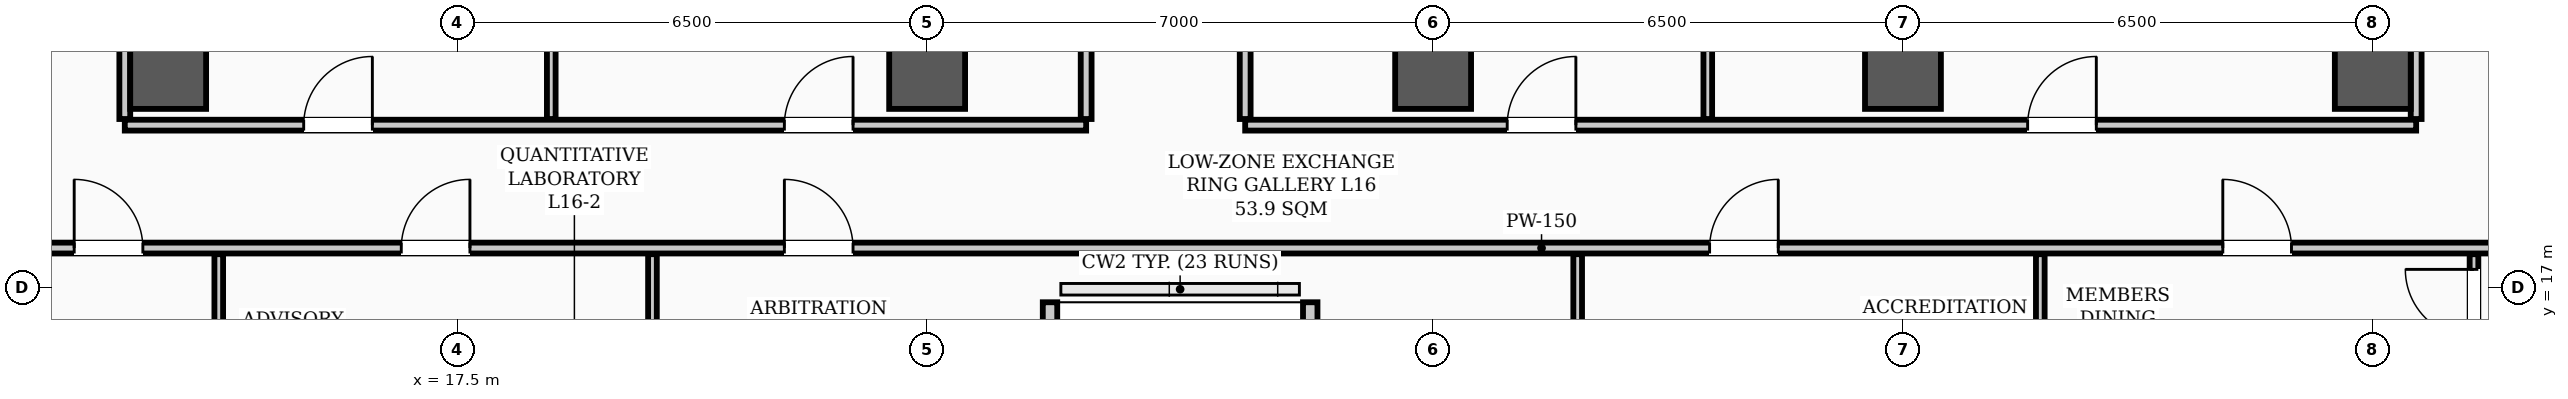
"""IFC4 building model, lengths in metres.
Left out: names, types, materials, properties, quantities, classifications, styles, units other than length and angle.
Written with IfcOpenShell. Run it as: python <this file> out.ifc"""

import sys

from ifc_helpers import new_model, si_unit, direction, frame, frame_2d, origin, origin_2d, place, context, subcontext, project, spatial, rectangle, hollow_rectangle, extrude, element, fill, save


model = new_model("IFC4")
c1 = context("Model", 3, precision=1e-05, world=origin(), true_north=direction((0.0, 1.0)))
c2 = subcontext(c1, "Body", "Model", "MODEL_VIEW")
j1 = project(units=[si_unit("LENGTHUNIT", "METRE"), si_unit("PLANEANGLEUNIT", "RADIAN")], contexts=[c1])
p1 = place(None, origin())
s1 = spatial("IfcSite", under=j1, at=p1, CompositionType="ELEMENT")
p2 = place(p1, origin())
s2 = spatial("IfcBuilding", under=s1, at=p2, CompositionType="ELEMENT")
p3 = place(p2, frame((0.0, 0.0, 65.5)))
s3 = spatial("IfcBuildingStorey", under=s2, at=p3, CompositionType="ELEMENT", Elevation=65.5)
for number, where, z_axis, x_axis in (
    (1, (13.5, 20.0, 0.0), (0.0, 0.0, 1.0), (1.0, 0.0, 0.0)),
    (2, (24.0, 20.0, 0.0), (0.0, 0.0, 1.0), (1.0, 0.0, 0.0)),
    (3, (31.0, 20.0, 0.0), (0.0, 0.0, 1.0), (1.0, 0.0, 0.0)),
    (4, (37.5, 20.0, 0.0), (0.0, 0.0, 1.0), (1.0, 0.0, 0.0)),
    (5, (44.0, 20.0, 0.0), (0.0, 0.0, 1.0), (1.0, 0.0, 0.0)),
):
    element("IfcColumn", number, at=place(p3, frame(where, z_axis=z_axis, x_axis=x_axis)), inside=s3, PredefinedType="COLUMN", context=c2, shape_type="SweptSolid", body=[
        extrude(hollow_rectangle(XDim=1.05, YDim=1.05, WallThickness=0.038, InnerFilletRadius=0.019, OuterFilletRadius=0.057, at=origin_2d()), origin(), (0.0, 0.0, 1.0), 3.9),
    ])
for number, where, z_axis, x_axis in (
    (6, (25.7, 15.1, 0.0), (0.0, 0.0, 1.0), (0.0, 1.0, 0.0)),
    (7, (29.3, 16.8, 0.0), (0.0, 0.0, 1.0), (0.0, -1.0, 0.0)),
):
    element("IfcWall", number, at=place(p3, frame(where, z_axis=z_axis, x_axis=x_axis)), inside=s3, PredefinedType="PARAPET", context=c2, shape_type="SweptSolid", body=[
        extrude(rectangle(XDim=1.7, YDim=0.2, at=frame_2d((0.85, 0.0))), origin(), (0.0, 0.0, 1.0), 1.2),
    ])
p4 = place(p3, frame((10.16, 17.55, 0.0), z_axis=(0.0, 0.0, 1.0), x_axis=(1.0, 0.0, 0.0)))
e8 = element("IfcWall", 8, at=p4, inside=s3, PredefinedType="PARTITIONING", context=c2, shape_type="SweptSolid", body=[
    extrude(rectangle(XDim=44.68, YDim=0.15, at=frame_2d((22.34, 0.0))), origin(), (0.0, 0.0, 1.0), 3.1),
])
p5 = place(p4, frame((2.04, 0.0, 0.0)))
e9 = element("IfcOpeningElement", 9, at=p5, cuts=e8, PredefinedType="OPENING", context=c2, shape_type="SweptSolid", body=[
    extrude(rectangle(XDim=0.95, YDim=2.08, at=frame_2d((0.475, 1.04))), frame((0.0, 0.085, 0.0), z_axis=(0.0, -1.0, 0.0), x_axis=(1.0, 0.0, 0.0)), (0.0, 0.0, 1.0), 0.17),
])
p6 = place(p4, frame((6.565, 0.0, 0.0)))
e10 = element("IfcOpeningElement", 10, at=p6, cuts=e8, PredefinedType="OPENING", context=c2, shape_type="SweptSolid", body=[
    extrude(rectangle(XDim=0.95, YDim=2.08, at=frame_2d((0.475, 1.04))), frame((0.0, 0.085, 0.0), z_axis=(0.0, -1.0, 0.0), x_axis=(1.0, 0.0, 0.0)), (0.0, 0.0, 1.0), 0.17),
])
p7 = place(p4, frame((11.865, 0.0, 0.0)))
e11 = element("IfcOpeningElement", 11, at=p7, cuts=e8, PredefinedType="OPENING", context=c2, shape_type="SweptSolid", body=[
    extrude(rectangle(XDim=0.95, YDim=2.08, at=frame_2d((0.475, 1.04))), frame((0.0, 0.085, 0.0), z_axis=(0.0, -1.0, 0.0), x_axis=(1.0, 0.0, 0.0)), (0.0, 0.0, 1.0), 0.17),
])
p8 = place(p4, frame((24.665, 0.0, 0.0)))
e12 = element("IfcOpeningElement", 12, at=p8, cuts=e8, PredefinedType="OPENING", context=c2, shape_type="SweptSolid", body=[
    extrude(rectangle(XDim=0.95, YDim=2.08, at=frame_2d((0.475, 1.04))), frame((0.0, 0.085, 0.0), z_axis=(0.0, -1.0, 0.0), x_axis=(1.0, 0.0, 0.0)), (0.0, 0.0, 1.0), 0.17),
])
p9 = place(p4, frame((31.765, 0.0, 0.0)))
e13 = element("IfcOpeningElement", 13, at=p9, cuts=e8, PredefinedType="OPENING", context=c2, shape_type="SweptSolid", body=[
    extrude(rectangle(XDim=0.95, YDim=2.08, at=frame_2d((0.475, 1.04))), frame((0.0, 0.085, 0.0), z_axis=(0.0, -1.0, 0.0), x_axis=(1.0, 0.0, 0.0)), (0.0, 0.0, 1.0), 0.17),
])
p10 = place(p3, frame((12.9, 19.25, 0.0), z_axis=(0.0, 0.0, 1.0), x_axis=(1.0, 0.0, 0.0)))
e14 = element("IfcWall", 14, at=p10, inside=s3, PredefinedType="PARTITIONING", context=c2, shape_type="SweptSolid", body=[
    extrude(rectangle(XDim=13.3, YDim=0.15, at=frame_2d((6.65, 0.0))), origin(), (0.0, 0.0, 1.0), 3.1),
])
p11 = place(p10, frame((2.475, 0.0, 0.0)))
e15 = element("IfcOpeningElement", 15, at=p11, cuts=e14, PredefinedType="OPENING", context=c2, shape_type="SweptSolid", body=[
    extrude(rectangle(XDim=0.95, YDim=2.08, at=frame_2d((0.475, 1.04))), frame((0.0, 0.085, 0.0), z_axis=(0.0, -1.0, 0.0), x_axis=(1.0, 0.0, 0.0)), (0.0, 0.0, 1.0), 0.17),
])
p12 = place(p10, frame((9.125, 0.0, 0.0)))
e16 = element("IfcOpeningElement", 16, at=p12, cuts=e14, PredefinedType="OPENING", context=c2, shape_type="SweptSolid", body=[
    extrude(rectangle(XDim=0.95, YDim=2.08, at=frame_2d((0.475, 1.04))), frame((0.0, 0.085, 0.0), z_axis=(0.0, -1.0, 0.0), x_axis=(1.0, 0.0, 0.0)), (0.0, 0.0, 1.0), 0.17),
])
p13 = place(p3, frame((28.4, 19.25, 0.0), z_axis=(0.0, 0.0, 1.0), x_axis=(1.0, 0.0, 0.0)))
e17 = element("IfcWall", 17, at=p13, inside=s3, PredefinedType="PARTITIONING", context=c2, shape_type="SweptSolid", body=[
    extrude(rectangle(XDim=16.2, YDim=0.15, at=frame_2d((8.1, 0.0))), origin(), (0.0, 0.0, 1.0), 3.1),
])
p14 = place(p13, frame((3.625, 0.0, 0.0)))
e18 = element("IfcOpeningElement", 18, at=p14, cuts=e17, PredefinedType="OPENING", context=c2, shape_type="SweptSolid", body=[
    extrude(rectangle(XDim=0.95, YDim=2.08, at=frame_2d((0.475, 1.04))), frame((0.0, 0.085, 0.0), z_axis=(0.0, -1.0, 0.0), x_axis=(1.0, 0.0, 0.0)), (0.0, 0.0, 1.0), 0.17),
])
p15 = place(p13, frame((10.825, 0.0, 0.0)))
e19 = element("IfcOpeningElement", 19, at=p15, cuts=e17, PredefinedType="OPENING", context=c2, shape_type="SweptSolid", body=[
    extrude(rectangle(XDim=0.95, YDim=2.08, at=frame_2d((0.475, 1.04))), frame((0.0, 0.085, 0.0), z_axis=(0.0, -1.0, 0.0), x_axis=(1.0, 0.0, 0.0)), (0.0, 0.0, 1.0), 0.17),
])
for number, where, z_axis, x_axis in (
    (20, (26.2, 19.335, 0.0), (0.0, 0.0, 1.0), (0.0, 1.0, 0.0)),
    (21, (28.4, 19.335, 0.0), (0.0, 0.0, 1.0), (0.0, 1.0, 0.0)),
    (22, (12.9, 19.335, 0.0), (0.0, 0.0, 1.0), (0.0, 1.0, 0.0)),
    (23, (44.6, 19.335, 0.0), (0.0, 0.0, 1.0), (0.0, 1.0, 0.0)),
):
    element("IfcWall", number, at=place(p3, frame(where, z_axis=z_axis, x_axis=x_axis)), inside=s3, PredefinedType="PARTITIONING", context=c2, shape_type="SweptSolid", body=[
        extrude(rectangle(XDim=7.38, YDim=0.15, at=frame_2d((3.69, 0.0))), origin(), (0.0, 0.0, 1.0), 3.0),
    ])
for number, where, z_axis, x_axis in (
    (24, (14.2, 15.31, 0.0), (0.0, 0.0, 1.0), (0.0, 1.0, 0.0)),
    (25, (20.2, 15.31, 0.0), (0.0, 0.0, 1.0), (0.0, 1.0, 0.0)),
    (26, (33.0, 15.31, 0.0), (0.0, 0.0, 1.0), (0.0, 1.0, 0.0)),
    (27, (39.4, 15.31, 0.0), (0.0, 0.0, 1.0), (0.0, 1.0, 0.0)),
):
    element("IfcWall", number, at=place(p3, frame(where, z_axis=z_axis, x_axis=x_axis)), inside=s3, PredefinedType="PARTITIONING", context=c2, shape_type="SweptSolid", body=[
        extrude(rectangle(XDim=2.155, YDim=0.12, at=frame_2d((1.078, 0.0))), origin(), (0.0, 0.0, 1.0), 3.212),
    ])
p16 = place(p3, frame((45.4, 15.31, 0.0), z_axis=(0.0, 0.0, 1.0), x_axis=(0.0, 1.0, 0.0)))
e28 = element("IfcWall", 28, at=p16, inside=s3, PredefinedType="PARTITIONING", context=c2, shape_type="SweptSolid", body=[
    extrude(rectangle(XDim=2.155, YDim=0.12, at=frame_2d((1.078, 0.0))), origin(), (0.0, 0.0, 1.0), 3.72),
])
p17 = place(p16, frame((0.995, 0.0, 0.0)))
e29 = element("IfcOpeningElement", 29, at=p17, cuts=e28, PredefinedType="OPENING", context=c2, shape_type="SweptSolid", body=[
    extrude(rectangle(XDim=0.95, YDim=2.08, at=frame_2d((0.475, 1.04))), frame((0.0, 0.07, 0.0), z_axis=(0.0, -1.0, 0.0), x_axis=(1.0, 0.0, 0.0)), (0.0, 0.0, 1.0), 0.14),
])
for number, where, z_axis, x_axis in (
    (30, (18.8, 19.335, 0.0), (0.0, 0.0, 1.0), (0.0, 1.0, 0.0)),
    (31, (34.8, 19.335, 0.0), (0.0, 0.0, 1.0), (0.0, 1.0, 0.0)),
):
    element("IfcWall", number, at=place(p3, frame(where, z_axis=z_axis, x_axis=x_axis)), inside=s3, PredefinedType="PARTITIONING", context=c2, shape_type="SweptSolid", body=[
        extrude(rectangle(XDim=7.38, YDim=0.12, at=frame_2d((3.69, 0.0))), origin(), (0.0, 0.0, 1.0), 3.0),
    ])
p18 = place(p5, origin())
e32 = element("IfcDoor", 32, at=p18, inside=s3, OperationType="SINGLE_SWING_LEFT", PredefinedType="DOOR", context=c2, shape_type="SweptSolid", body=[
    extrude(rectangle(XDim=0.95, YDim=2.08, at=frame_2d((0.475, 1.04))), frame((0.0, 0.025, 0.0), z_axis=(0.0, -1.0, 0.0), x_axis=(1.0, 0.0, 0.0)), (0.0, 0.0, 1.0), 0.05),
])
fill(e9, e32)
p19 = place(p6, origin())
e33 = element("IfcDoor", 33, at=p19, inside=s3, OperationType="SINGLE_SWING_RIGHT", PredefinedType="DOOR", context=c2, shape_type="SweptSolid", body=[
    extrude(rectangle(XDim=0.95, YDim=2.08, at=frame_2d((0.475, 1.04))), frame((0.0, 0.025, 0.0), z_axis=(0.0, -1.0, 0.0), x_axis=(1.0, 0.0, 0.0)), (0.0, 0.0, 1.0), 0.05),
])
fill(e10, e33)
p20 = place(p7, origin())
e34 = element("IfcDoor", 34, at=p20, inside=s3, OperationType="SINGLE_SWING_LEFT", PredefinedType="DOOR", context=c2, shape_type="SweptSolid", body=[
    extrude(rectangle(XDim=0.95, YDim=2.08, at=frame_2d((0.475, 1.04))), frame((0.0, 0.025, 0.0), z_axis=(0.0, -1.0, 0.0), x_axis=(1.0, 0.0, 0.0)), (0.0, 0.0, 1.0), 0.05),
])
fill(e11, e34)
p21 = place(p8, origin())
e35 = element("IfcDoor", 35, at=p21, inside=s3, OperationType="SINGLE_SWING_RIGHT", PredefinedType="DOOR", context=c2, shape_type="SweptSolid", body=[
    extrude(rectangle(XDim=0.95, YDim=2.08, at=frame_2d((0.475, 1.04))), frame((0.0, 0.025, 0.0), z_axis=(0.0, -1.0, 0.0), x_axis=(1.0, 0.0, 0.0)), (0.0, 0.0, 1.0), 0.05),
])
fill(e12, e35)
p22 = place(p9, origin())
e36 = element("IfcDoor", 36, at=p22, inside=s3, OperationType="SINGLE_SWING_LEFT", PredefinedType="DOOR", context=c2, shape_type="SweptSolid", body=[
    extrude(rectangle(XDim=0.95, YDim=2.08, at=frame_2d((0.475, 1.04))), frame((0.0, 0.025, 0.0), z_axis=(0.0, -1.0, 0.0), x_axis=(1.0, 0.0, 0.0)), (0.0, 0.0, 1.0), 0.05),
])
fill(e13, e36)
p23 = place(p17, origin())
e37 = element("IfcDoor", 37, at=p23, inside=s3, OperationType="SINGLE_SWING_RIGHT", PredefinedType="DOOR", context=c2, shape_type="SweptSolid", body=[
    extrude(rectangle(XDim=0.95, YDim=2.08, at=frame_2d((0.475, 1.04))), frame((0.0, 0.025, 0.0), z_axis=(0.0, -1.0, 0.0), x_axis=(1.0, 0.0, 0.0)), (0.0, 0.0, 1.0), 0.05),
])
fill(e29, e37)
p24 = place(p11, origin())
e38 = element("IfcDoor", 38, at=p24, inside=s3, OperationType="SINGLE_SWING_RIGHT", PredefinedType="DOOR", context=c2, shape_type="SweptSolid", body=[
    extrude(rectangle(XDim=0.95, YDim=2.08, at=frame_2d((0.475, 1.04))), frame((0.0, 0.025, 0.0), z_axis=(0.0, -1.0, 0.0), x_axis=(1.0, 0.0, 0.0)), (0.0, 0.0, 1.0), 0.05),
])
fill(e15, e38)
p25 = place(p12, origin())
e39 = element("IfcDoor", 39, at=p25, inside=s3, OperationType="SINGLE_SWING_RIGHT", PredefinedType="DOOR", context=c2, shape_type="SweptSolid", body=[
    extrude(rectangle(XDim=0.95, YDim=2.08, at=frame_2d((0.475, 1.04))), frame((0.0, 0.025, 0.0), z_axis=(0.0, -1.0, 0.0), x_axis=(1.0, 0.0, 0.0)), (0.0, 0.0, 1.0), 0.05),
])
fill(e16, e39)
p26 = place(p14, origin())
e40 = element("IfcDoor", 40, at=p26, inside=s3, OperationType="SINGLE_SWING_RIGHT", PredefinedType="DOOR", context=c2, shape_type="SweptSolid", body=[
    extrude(rectangle(XDim=0.95, YDim=2.08, at=frame_2d((0.475, 1.04))), frame((0.0, 0.025, 0.0), z_axis=(0.0, -1.0, 0.0), x_axis=(1.0, 0.0, 0.0)), (0.0, 0.0, 1.0), 0.05),
])
fill(e18, e40)
p27 = place(p15, origin())
e41 = element("IfcDoor", 41, at=p27, inside=s3, OperationType="SINGLE_SWING_RIGHT", PredefinedType="DOOR", context=c2, shape_type="SweptSolid", body=[
    extrude(rectangle(XDim=0.95, YDim=2.08, at=frame_2d((0.475, 1.04))), frame((0.0, 0.025, 0.0), z_axis=(0.0, -1.0, 0.0), x_axis=(1.0, 0.0, 0.0)), (0.0, 0.0, 1.0), 0.05),
])
fill(e19, e41)
save(model, sys.argv[1])
